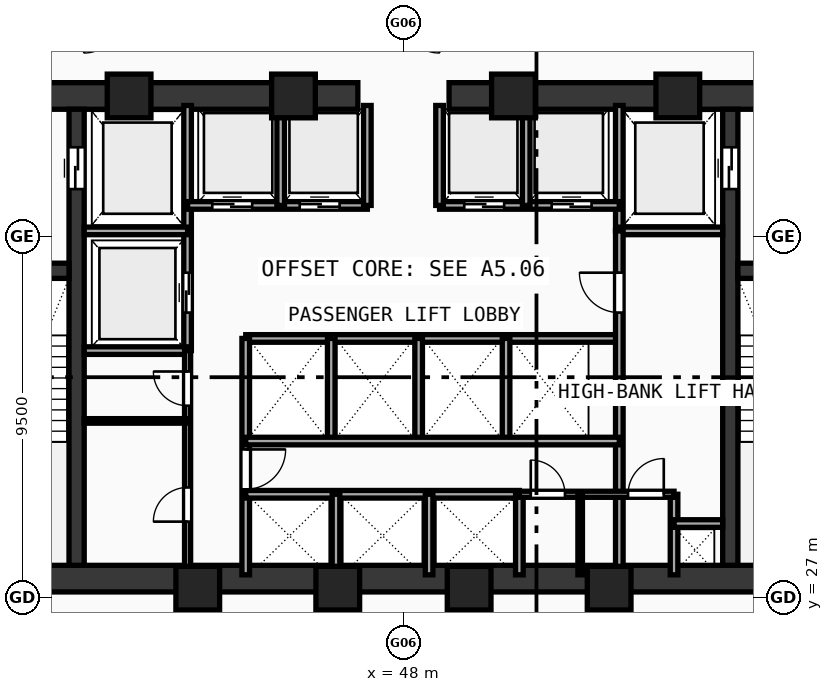
"""IFC4 building model, lengths in metres.
Left out: names, types, materials, properties, quantities, classifications, styles, units other than length and angle.
Written with IfcOpenShell. Run it as: python <this file> out.ifc"""

import sys

from ifc_helpers import new_model, si_unit, direction, frame, frame_2d, origin, origin_with_axes, origin_2d, place, context, subcontext, project, spatial, rectangle, hollow_rectangle, extrude, source, transform, mapped, element, fill, save


model = new_model("IFC4")
c1 = context("Model", 3, precision=1e-05, world=origin(), true_north=direction((0.0, 1.0)))
c2 = subcontext(c1, "Body", "Model", "MODEL_VIEW")
j1 = project(units=[si_unit("LENGTHUNIT", "METRE"), si_unit("PLANEANGLEUNIT", "RADIAN")], contexts=[c1])
p1 = place(None, origin())
s1 = spatial("IfcSite", under=j1, at=p1, CompositionType="ELEMENT")
p2 = place(p1, origin())
s2 = spatial("IfcBuilding", under=s1, at=p2, CompositionType="ELEMENT")
p3 = place(p2, frame((0.0, 0.0, 63.07)))
s3 = spatial("IfcBuildingStorey", under=s2, at=p3, CompositionType="ELEMENT", Elevation=63.07)
p4 = place(p3, frame((35.45, 27.5, 0.0), z_axis=(0.0, 0.0, 1.0), x_axis=(1.0, 0.0, 0.0)))
e1 = element("IfcWall", 1, at=p4, inside=s3, PredefinedType="SHEAR", context=c2, shape_type="SweptSolid", body=[
    extrude(rectangle(XDim=25.1, YDim=0.7, at=frame_2d((12.55, 0.0))), origin(), (0.0, 0.0, 1.0), 3.37),
])
p5 = place(p3, frame((35.45, 40.2, 0.0), z_axis=(0.0, 0.0, 1.0), x_axis=(1.0, 0.0, 0.0)))
e2 = element("IfcWall", 2, at=p5, inside=s3, PredefinedType="SHEAR", context=c2, shape_type="SweptSolid", body=[
    extrude(rectangle(XDim=11.35, YDim=0.7, at=frame_2d((5.675, 0.0))), origin(), (0.0, 0.0, 1.0), 3.37),
])
p6 = place(p5, frame((1.7, 0.0, 0.0)))
e3 = element("IfcOpeningElement", 3, at=p6, cuts=e2, PredefinedType="OPENING", context=c2, shape_type="SweptSolid", body=[
    extrude(rectangle(XDim=1.05, YDim=2.1, at=frame_2d((0.525, 1.05))), frame((0.0, 0.36, 0.0), z_axis=(0.0, -1.0, 0.0), x_axis=(1.0, 0.0, 0.0)), (0.0, 0.0, 1.0), 0.72),
])
p7 = place(p3, frame((49.2, 40.2, 0.0), z_axis=(0.0, 0.0, 1.0), x_axis=(1.0, 0.0, 0.0)))
e4 = element("IfcWall", 4, at=p7, inside=s3, PredefinedType="SHEAR", context=c2, shape_type="SweptSolid", body=[
    extrude(rectangle(XDim=11.35, YDim=0.7, at=frame_2d((5.675, 0.0))), origin(), (0.0, 0.0, 1.0), 3.37),
])
p8 = place(p7, frame((8.6, 0.0, 0.0)))
e5 = element("IfcOpeningElement", 5, at=p8, cuts=e4, PredefinedType="OPENING", context=c2, shape_type="SweptSolid", body=[
    extrude(rectangle(XDim=1.05, YDim=2.1, at=frame_2d((0.525, 1.05))), frame((0.0, 0.36, 0.0), z_axis=(0.0, -1.0, 0.0), x_axis=(1.0, 0.0, 0.0)), (0.0, 0.0, 1.0), 0.72),
])
p9 = place(p3, frame((39.4, 27.85, 0.0), z_axis=(0.0, 0.0, 1.0), x_axis=(0.0, 1.0, 0.0)))
e6 = element("IfcWall", 6, at=p9, inside=s3, PredefinedType="SHEAR", context=c2, shape_type="SweptSolid", body=[
    extrude(rectangle(XDim=12.0, YDim=0.4, at=frame_2d((6.0, 0.0))), origin(), (0.0, 0.0, 1.0), 3.37),
])
p10 = place(p9, frame((9.9, 0.0, 0.0)))
e7 = element("IfcOpeningElement", 7, at=p10, cuts=e6, PredefinedType="OPENING", context=c2, shape_type="SweptSolid", body=[
    extrude(rectangle(XDim=1.1, YDim=2.1, at=frame_2d((0.55, 1.05))), frame((0.0, 0.21, 0.0), z_axis=(0.0, -1.0, 0.0), x_axis=(1.0, 0.0, 0.0)), (0.0, 0.0, 1.0), 0.42),
])
p11 = place(p3, frame((56.6, 27.85, 0.0), z_axis=(0.0, 0.0, 1.0), x_axis=(0.0, 1.0, 0.0)))
e8 = element("IfcWall", 8, at=p11, inside=s3, PredefinedType="SHEAR", context=c2, shape_type="SweptSolid", body=[
    extrude(rectangle(XDim=12.0, YDim=0.4, at=frame_2d((6.0, 0.0))), origin(), (0.0, 0.0, 1.0), 3.37),
])
p12 = place(p11, frame((9.9, 0.0, 0.0)))
e9 = element("IfcOpeningElement", 9, at=p12, cuts=e8, PredefinedType="OPENING", context=c2, shape_type="SweptSolid", body=[
    extrude(rectangle(XDim=1.1, YDim=2.1, at=frame_2d((0.55, 1.05))), frame((0.0, 0.21, 0.0), z_axis=(0.0, -1.0, 0.0), x_axis=(1.0, 0.0, 0.0)), (0.0, 0.0, 1.0), 0.42),
])
p13 = place(p3, frame((36.15, 35.6, 0.0), z_axis=(0.0, 0.0, 1.0), x_axis=(1.0, 0.0, 0.0)))
e10 = element("IfcWall", 10, at=p13, inside=s3, PredefinedType="SHEAR", context=c2, shape_type="SweptSolid", body=[
    extrude(rectangle(XDim=3.05, YDim=0.4, at=frame_2d((1.525, 0.0))), origin(), (0.0, 0.0, 1.0), 3.37),
])
p14 = place(p13, frame((0.97, 0.0, 0.0)))
e11 = element("IfcOpeningElement", 11, at=p14, cuts=e10, PredefinedType="OPENING", context=c2, shape_type="SweptSolid", body=[
    extrude(rectangle(XDim=1.05, YDim=2.1, at=frame_2d((0.525, 1.05))), frame((0.0, 0.21, 0.0), z_axis=(0.0, -1.0, 0.0), x_axis=(1.0, 0.0, 0.0)), (0.0, 0.0, 1.0), 0.42),
])
p15 = place(p3, frame((56.8, 35.6, 0.0), z_axis=(0.0, 0.0, 1.0), x_axis=(1.0, 0.0, 0.0)))
e12 = element("IfcWall", 12, at=p15, inside=s3, PredefinedType="SHEAR", context=c2, shape_type="SweptSolid", body=[
    extrude(rectangle(XDim=3.05, YDim=0.4, at=frame_2d((1.525, 0.0))), origin(), (0.0, 0.0, 1.0), 3.37),
])
p16 = place(p15, frame((1.02, 0.0, 0.0)))
e13 = element("IfcOpeningElement", 13, at=p16, cuts=e12, PredefinedType="OPENING", context=c2, shape_type="SweptSolid", body=[
    extrude(rectangle(XDim=1.05, YDim=2.1, at=frame_2d((0.525, 1.05))), frame((0.0, 0.21, 0.0), z_axis=(0.0, -1.0, 0.0), x_axis=(1.0, 0.0, 0.0)), (0.0, 0.0, 1.0), 0.42),
])
m1 = source(origin(), c2, "Body", "SweptSolid", [
    extrude(hollow_rectangle(XDim=1.15, YDim=1.15, WallThickness=0.048, at=origin_2d()), origin(), (0.0, 0.0, 1.0), 3.63),
])
for number, where, z_axis, x_axis in (
    (14, (42.588, 27.25, -0.26), (0.0, 0.0, 1.0), (1.0, 0.0, 0.0)),
    (15, (46.272, 27.25, -0.26), (0.0, 0.0, 1.0), (1.0, 0.0, 0.0)),
    (16, (49.729, 27.25, -0.26), (0.0, 0.0, 1.0), (1.0, 0.0, 0.0)),
    (17, (53.412, 27.25, -0.26), (0.0, 0.0, 1.0), (1.0, 0.0, 0.0)),
    (18, (55.219, 40.2, -0.26), (0.0, 0.0, 1.0), (1.0, 0.0, 0.0)),
    (19, (50.894, 40.2, -0.26), (0.0, 0.0, 1.0), (1.0, 0.0, 0.0)),
    (20, (45.106, 40.2, -0.26), (0.0, 0.0, 1.0), (1.0, 0.0, 0.0)),
    (21, (40.781, 40.2, -0.26), (0.0, 0.0, 1.0), (1.0, 0.0, 0.0)),
):
    element("IfcColumn", number, at=place(p3, frame(where, z_axis=z_axis, x_axis=x_axis)), inside=s3, PredefinedType="COLUMN", context=c2, shape_type="MappedRepresentation", body=[
        mapped(m1, transform((0.0, 0.0, 0.0), scale=1.0)),
    ])
p17 = place(p3, frame((42.32, 33.5, 0.0), z_axis=(0.0, 0.0, 1.0), x_axis=(0.0, 1.0, 0.0)))
e22 = element("IfcWall", 22, at=p17, inside=s3, PredefinedType="SOLIDWALL", context=c2, shape_type="SweptSolid", body=[
    extrude(rectangle(XDim=6.45, YDim=0.2, at=frame_2d((3.225, 0.0))), origin(), (0.0, 0.0, 1.0), 3.37),
])
p18 = place(p17, frame((1.0, 0.0, 0.0)))
e23 = element("IfcOpeningElement", 23, at=p18, cuts=e22, PredefinedType="OPENING", context=c2, shape_type="SweptSolid", body=[
    extrude(rectangle(XDim=1.05, YDim=2.1, at=frame_2d((0.525, 1.05))), frame((0.0, 0.11, 0.0), z_axis=(0.0, -1.0, 0.0), x_axis=(1.0, 0.0, 0.0)), (0.0, 0.0, 1.0), 0.22),
])
for number, where, z_axis, x_axis in (
    (24, (39.6, 36.65, 0.0), (0.0, 0.0, 1.0), (1.0, 0.0, 0.0)),
    (25, (39.6, 33.5, 0.0), (0.0, 0.0, 1.0), (1.0, 0.0, 0.0)),
):
    element("IfcWall", number, at=place(p3, frame(where, z_axis=z_axis, x_axis=x_axis)), inside=s3, PredefinedType="SOLIDWALL", context=c2, shape_type="SweptSolid", body=[
        extrude(rectangle(XDim=2.72, YDim=0.2, at=frame_2d((1.36, 0.0))), origin(), (0.0, 0.0, 1.0), 3.37),
    ])
p19 = place(p3, frame((53.68, 36.65, 0.0), z_axis=(0.0, 0.0, 1.0), x_axis=(0.0, 1.0, 0.0)))
e26 = element("IfcWall", 26, at=p19, inside=s3, PredefinedType="SOLIDWALL", context=c2, shape_type="SweptSolid", body=[
    extrude(rectangle(XDim=3.3, YDim=0.2, at=frame_2d((1.65, 0.0))), origin(), (0.0, 0.0, 1.0), 3.37),
])
p20 = place(p3, frame((53.68, 36.65, 0.0), z_axis=(0.0, 0.0, 1.0), x_axis=(1.0, 0.0, 0.0)))
e27 = element("IfcWall", 27, at=p20, inside=s3, PredefinedType="SOLIDWALL", context=c2, shape_type="SweptSolid", body=[
    extrude(rectangle(XDim=2.72, YDim=0.2, at=frame_2d((1.36, 0.0))), origin(), (0.0, 0.0, 1.0), 3.37),
])
p21 = place(p3, frame((42.32, 37.32, 0.0), z_axis=(0.0, 0.0, 1.0), x_axis=(1.0, 0.0, 0.0)))
e28 = element("IfcWall", 28, at=p21, inside=s3, PredefinedType="SOLIDWALL", context=c2, shape_type="SweptSolid", body=[
    extrude(rectangle(XDim=4.73, YDim=0.2, at=frame_2d((2.365, 0.0))), origin(), (0.0, 0.0, 1.0), 3.37),
])
p22 = place(p21, frame((0.65, 0.0, 0.0)))
e29 = element("IfcOpeningElement", 29, at=p22, cuts=e28, PredefinedType="OPENING", context=c2, shape_type="SweptSolid", body=[
    extrude(rectangle(XDim=1.05, YDim=2.1, at=frame_2d((0.525, 1.05))), frame((0.0, 0.11, 0.0), z_axis=(0.0, -1.0, 0.0), x_axis=(1.0, 0.0, 0.0)), (0.0, 0.0, 1.0), 0.22),
])
p23 = place(p21, frame((2.95, 0.0, 0.0)))
e30 = element("IfcOpeningElement", 30, at=p23, cuts=e28, PredefinedType="OPENING", context=c2, shape_type="SweptSolid", body=[
    extrude(rectangle(XDim=1.05, YDim=2.1, at=frame_2d((0.525, 1.05))), frame((0.0, 0.11, 0.0), z_axis=(0.0, -1.0, 0.0), x_axis=(1.0, 0.0, 0.0)), (0.0, 0.0, 1.0), 0.22),
])
p24 = place(p3, frame((48.95, 37.32, 0.0), z_axis=(0.0, 0.0, 1.0), x_axis=(1.0, 0.0, 0.0)))
e31 = element("IfcWall", 31, at=p24, inside=s3, PredefinedType="SOLIDWALL", context=c2, shape_type="SweptSolid", body=[
    extrude(rectangle(XDim=4.73, YDim=0.2, at=frame_2d((2.365, 0.0))), origin(), (0.0, 0.0, 1.0), 3.37),
])
p25 = place(p24, frame((0.65, 0.0, 0.0)))
e32 = element("IfcOpeningElement", 32, at=p25, cuts=e31, PredefinedType="OPENING", context=c2, shape_type="SweptSolid", body=[
    extrude(rectangle(XDim=1.05, YDim=2.1, at=frame_2d((0.525, 1.05))), frame((0.0, 0.11, 0.0), z_axis=(0.0, -1.0, 0.0), x_axis=(1.0, 0.0, 0.0)), (0.0, 0.0, 1.0), 0.22),
])
p26 = place(p24, frame((2.95, 0.0, 0.0)))
e33 = element("IfcOpeningElement", 33, at=p26, cuts=e31, PredefinedType="OPENING", context=c2, shape_type="SweptSolid", body=[
    extrude(rectangle(XDim=1.05, YDim=2.1, at=frame_2d((0.525, 1.05))), frame((0.0, 0.11, 0.0), z_axis=(0.0, -1.0, 0.0), x_axis=(1.0, 0.0, 0.0)), (0.0, 0.0, 1.0), 0.22),
])
for number, where, z_axis, x_axis in (
    (34, (47.05, 37.32, 0.0), (0.0, 0.0, 1.0), (0.0, 1.0, 0.0)),
    (35, (48.95, 37.32, 0.0), (0.0, 0.0, 1.0), (0.0, 1.0, 0.0)),
    (36, (44.77, 37.32, 0.0), (0.0, 0.0, 1.0), (0.0, 1.0, 0.0)),
    (37, (51.23, 37.32, 0.0), (0.0, 0.0, 1.0), (0.0, 1.0, 0.0)),
):
    element("IfcWall", number, at=place(p3, frame(where, z_axis=z_axis, x_axis=x_axis)), inside=s3, PredefinedType="SOLIDWALL", context=c2, shape_type="SweptSolid", body=[
        extrude(rectangle(XDim=2.63, YDim=0.2, at=frame_2d((1.315, 0.0))), origin(), (0.0, 0.0, 1.0), 3.37),
    ])
p27 = place(p3, frame((43.85, 33.82, 0.0), z_axis=(0.0, 0.0, 1.0), x_axis=(1.0, 0.0, 0.0)))
e38 = element("IfcWall", 38, at=p27, inside=s3, PredefinedType="SOLIDWALL", context=c2, shape_type="SweptSolid", body=[
    extrude(rectangle(XDim=9.83, YDim=0.2, at=frame_2d((4.915, 0.0))), origin(), (0.0, 0.0, 1.0), 3.37),
])
p28 = place(p3, frame((43.85, 27.6, 0.0), z_axis=(0.0, 0.0, 1.0), x_axis=(0.0, 1.0, 0.0)))
e39 = element("IfcWall", 39, at=p28, inside=s3, PredefinedType="SOLIDWALL", context=c2, shape_type="SweptSolid", body=[
    extrude(rectangle(XDim=6.22, YDim=0.2, at=frame_2d((3.11, 0.0))), origin(), (0.0, 0.0, 1.0), 3.37),
])
p29 = place(p28, frame((2.25, 0.0, 0.0)))
e40 = element("IfcOpeningElement", 40, at=p29, cuts=e39, PredefinedType="OPENING", context=c2, shape_type="SweptSolid", body=[
    extrude(rectangle(XDim=1.05, YDim=2.1, at=frame_2d((0.525, 1.05))), frame((0.0, 0.11, 0.0), z_axis=(0.0, -1.0, 0.0), x_axis=(1.0, 0.0, 0.0)), (0.0, 0.0, 1.0), 0.22),
])
p30 = place(p3, frame((53.68, 27.6, 0.0), z_axis=(0.0, 0.0, 1.0), x_axis=(0.0, 1.0, 0.0)))
e41 = element("IfcWall", 41, at=p30, inside=s3, PredefinedType="SOLIDWALL", context=c2, shape_type="SweptSolid", body=[
    extrude(rectangle(XDim=9.05, YDim=0.2, at=frame_2d((4.525, 0.0))), origin(), (0.0, 0.0, 1.0), 3.37),
])
p31 = place(p30, frame((6.9, 0.0, 0.0)))
e42 = element("IfcOpeningElement", 42, at=p31, cuts=e41, PredefinedType="OPENING", context=c2, shape_type="SweptSolid", body=[
    extrude(rectangle(XDim=1.05, YDim=2.1, at=frame_2d((0.525, 1.05))), frame((0.0, 0.11, 0.0), z_axis=(0.0, -1.0, 0.0), x_axis=(1.0, 0.0, 0.0)), (0.0, 0.0, 1.0), 0.22),
])
for number, where, z_axis, x_axis in (
    (43, (46.1, 31.12, 0.0), (0.0, 0.0, 1.0), (0.0, 1.0, 0.0)),
    (44, (48.4, 31.12, 0.0), (0.0, 0.0, 1.0), (0.0, 1.0, 0.0)),
    (45, (50.7, 31.12, 0.0), (0.0, 0.0, 1.0), (0.0, 1.0, 0.0)),
):
    element("IfcWall", number, at=place(p3, frame(where, z_axis=z_axis, x_axis=x_axis)), inside=s3, PredefinedType="SOLIDWALL", context=c2, shape_type="SweptSolid", body=[
        extrude(rectangle(XDim=2.7, YDim=0.2, at=frame_2d((1.35, 0.0))), origin(), (0.0, 0.0, 1.0), 3.37),
    ])
p32 = place(p3, frame((43.85, 29.72, 0.0), z_axis=(0.0, 0.0, 1.0), x_axis=(1.0, 0.0, 0.0)))
e46 = element("IfcWall", 46, at=p32, inside=s3, PredefinedType="SOLIDWALL", context=c2, shape_type="SweptSolid", body=[
    extrude(rectangle(XDim=7.2, YDim=0.2, at=frame_2d((3.6, 0.0))), origin(), (0.0, 0.0, 1.0), 3.37),
])
p33 = place(p3, frame((51.05, 27.6, 0.0), z_axis=(0.0, 0.0, 1.0), x_axis=(0.0, 1.0, 0.0)))
e47 = element("IfcWall", 47, at=p33, inside=s3, PredefinedType="SOLIDWALL", context=c2, shape_type="SweptSolid", body=[
    extrude(rectangle(XDim=2.12, YDim=0.2, at=frame_2d((1.06, 0.0))), origin(), (0.0, 0.0, 1.0), 3.37),
])
p34 = place(p3, frame((43.85, 31.12, 0.0), z_axis=(0.0, 0.0, 1.0), x_axis=(1.0, 0.0, 0.0)))
e48 = element("IfcWall", 48, at=p34, inside=s3, PredefinedType="SOLIDWALL", context=c2, shape_type="SweptSolid", body=[
    extrude(rectangle(XDim=9.83, YDim=0.2, at=frame_2d((4.915, 0.0))), origin(), (0.0, 0.0, 1.0), 3.37),
])
for number, where, z_axis, x_axis in (
    (49, (46.225, 27.6, 0.0), (0.0, 0.0, 1.0), (0.0, 1.0, 0.0)),
    (50, (48.675, 27.6, 0.0), (0.0, 0.0, 1.0), (0.0, 1.0, 0.0)),
    (51, (55.12, 27.6, 0.0), (0.0, 0.0, 1.0), (0.0, 1.0, 0.0)),
):
    element("IfcWall", number, at=place(p3, frame(where, z_axis=z_axis, x_axis=x_axis)), inside=s3, PredefinedType="SOLIDWALL", context=c2, shape_type="SweptSolid", body=[
        extrude(rectangle(XDim=2.12, YDim=0.2, at=frame_2d((1.06, 0.0))), origin(), (0.0, 0.0, 1.0), 3.37),
    ])
p35 = place(p3, frame((55.12, 28.95, 0.0), z_axis=(0.0, 0.0, 1.0), x_axis=(1.0, 0.0, 0.0)))
e52 = element("IfcWall", 52, at=p35, inside=s3, PredefinedType="SOLIDWALL", context=c2, shape_type="SweptSolid", body=[
    extrude(rectangle(XDim=1.28, YDim=0.2, at=frame_2d((0.64, 0.0))), origin(), (0.0, 0.0, 1.0), 3.37),
])
p36 = place(p3, frame((42.32, 27.6, 0.0), z_axis=(0.0, 0.0, 1.0), x_axis=(0.0, 1.0, 0.0)))
e53 = element("IfcWall", 53, at=p36, inside=s3, PredefinedType="PARTITIONING", context=c2, shape_type="SweptSolid", body=[
    extrude(rectangle(XDim=5.9, YDim=0.16, at=frame_2d((2.95, 0.0))), origin(), (0.0, 0.0, 1.0), 3.37),
])
p37 = place(p36, frame((1.4, 0.0, 0.0)))
e54 = element("IfcOpeningElement", 54, at=p37, cuts=e53, PredefinedType="OPENING", context=c2, shape_type="SweptSolid", body=[
    extrude(rectangle(XDim=0.9, YDim=2.1, at=frame_2d((0.45, 1.05))), frame((0.0, 0.09, 0.0), z_axis=(0.0, -1.0, 0.0), x_axis=(1.0, 0.0, 0.0)), (0.0, 0.0, 1.0), 0.18),
])
p38 = place(p36, frame((4.45, 0.0, 0.0)))
e55 = element("IfcOpeningElement", 55, at=p38, cuts=e53, PredefinedType="OPENING", context=c2, shape_type="SweptSolid", body=[
    extrude(rectangle(XDim=0.9, YDim=2.1, at=frame_2d((0.45, 1.05))), frame((0.0, 0.09, 0.0), z_axis=(0.0, -1.0, 0.0), x_axis=(1.0, 0.0, 0.0)), (0.0, 0.0, 1.0), 0.18),
])
p39 = place(p3, frame((51.05, 29.72, 0.0), z_axis=(0.0, 0.0, 1.0), x_axis=(1.0, 0.0, 0.0)))
e56 = element("IfcWall", 56, at=p39, inside=s3, PredefinedType="PARTITIONING", context=c2, shape_type="SweptSolid", body=[
    extrude(rectangle(XDim=4.07, YDim=0.16, at=frame_2d((2.035, 0.0))), origin(), (0.0, 0.0, 1.0), 3.37),
])
p40 = place(p39, frame((0.3, 0.0, 0.0)))
e57 = element("IfcOpeningElement", 57, at=p40, cuts=e56, PredefinedType="OPENING", context=c2, shape_type="SweptSolid", body=[
    extrude(rectangle(XDim=0.9, YDim=2.1, at=frame_2d((0.45, 1.05))), frame((0.0, 0.09, 0.0), z_axis=(0.0, -1.0, 0.0), x_axis=(1.0, 0.0, 0.0)), (0.0, 0.0, 1.0), 0.18),
])
p41 = place(p39, frame((2.86, 0.0, 0.0)))
e58 = element("IfcOpeningElement", 58, at=p41, cuts=e56, PredefinedType="OPENING", context=c2, shape_type="SweptSolid", body=[
    extrude(rectangle(XDim=0.94, YDim=2.1, at=frame_2d((0.47, 1.05))), frame((0.0, 0.09, 0.0), z_axis=(0.0, -1.0, 0.0), x_axis=(1.0, 0.0, 0.0)), (0.0, 0.0, 1.0), 0.18),
])
p42 = place(p3, frame((39.6, 31.65, 0.0), z_axis=(0.0, 0.0, 1.0), x_axis=(1.0, 0.0, 0.0)))
e59 = element("IfcWall", 59, at=p42, inside=s3, PredefinedType="PARTITIONING", context=c2, shape_type="SweptSolid", body=[
    extrude(rectangle(XDim=2.72, YDim=0.12, at=frame_2d((1.36, 0.0))), origin(), (0.0, 0.0, 1.0), 3.37),
])
p43 = place(p3, frame((52.65, 27.6, 0.0), z_axis=(0.0, 0.0, 1.0), x_axis=(0.0, 1.0, 0.0)))
e60 = element("IfcWall", 60, at=p43, inside=s3, PredefinedType="PARTITIONING", context=c2, shape_type="SweptSolid", body=[
    extrude(rectangle(XDim=2.12, YDim=0.12, at=frame_2d((1.06, 0.0))), origin(), (0.0, 0.0, 1.0), 3.37),
])
m2 = source(origin(), c2, "Body", "SweptSolid", [
    extrude(rectangle(XDim=1.1, YDim=2.1, at=frame_2d((0.55, 1.05))), frame((0.0, 0.025, 0.0), z_axis=(0.0, -1.0, 0.0), x_axis=(1.0, 0.0, 0.0)), (0.0, 0.0, 1.0), 0.05),
])
p44 = place(p10, frame((1.1, 0.0, 0.0), z_axis=(0.0, 0.0, 1.0), x_axis=(-1.0, 0.0, 0.0)))
e61 = element("IfcDoor", 61, at=p44, inside=s3, OperationType="DOUBLE_DOOR_SLIDING", PredefinedType="DOOR", context=c2, shape_type="MappedRepresentation", body=[
    mapped(m2, transform((0.0, 0.0, 0.0), scale=1.0)),
])
fill(e7, e61)
p45 = place(p12, origin_with_axes())
e62 = element("IfcDoor", 62, at=p45, inside=s3, OperationType="DOUBLE_DOOR_SLIDING", PredefinedType="DOOR", context=c2, shape_type="MappedRepresentation", body=[
    mapped(m2, transform((0.0, 0.0, 0.0), scale=1.0)),
])
fill(e9, e62)
m3 = source(origin(), c2, "Body", "SweptSolid", [
    extrude(rectangle(XDim=1.05, YDim=2.1, at=frame_2d((0.525, 1.05))), frame((0.0, 0.025, 0.0), z_axis=(0.0, -1.0, 0.0), x_axis=(1.0, 0.0, 0.0)), (0.0, 0.0, 1.0), 0.05),
])
p46 = place(p18, origin_with_axes())
e63 = element("IfcDoor", 63, at=p46, inside=s3, OperationType="DOUBLE_DOOR_SLIDING", PredefinedType="DOOR", context=c2, shape_type="MappedRepresentation", body=[
    mapped(m3, transform((0.0, 0.0, 0.0), scale=1.0)),
])
fill(e23, e63)
p47 = place(p22, frame((1.05, 0.0, 0.0), z_axis=(0.0, 0.0, 1.0), x_axis=(-1.0, 0.0, 0.0)))
e64 = element("IfcDoor", 64, at=p47, inside=s3, OperationType="DOUBLE_DOOR_SLIDING", PredefinedType="DOOR", context=c2, shape_type="MappedRepresentation", body=[
    mapped(m3, transform((0.0, 0.0, 0.0), scale=1.0)),
])
fill(e29, e64)
p48 = place(p23, frame((1.05, 0.0, 0.0), z_axis=(0.0, 0.0, 1.0), x_axis=(-1.0, 0.0, 0.0)))
e65 = element("IfcDoor", 65, at=p48, inside=s3, OperationType="DOUBLE_DOOR_SLIDING", PredefinedType="DOOR", context=c2, shape_type="MappedRepresentation", body=[
    mapped(m3, transform((0.0, 0.0, 0.0), scale=1.0)),
])
fill(e30, e65)
p49 = place(p25, frame((1.05, 0.0, 0.0), z_axis=(0.0, 0.0, 1.0), x_axis=(-1.0, 0.0, 0.0)))
e66 = element("IfcDoor", 66, at=p49, inside=s3, OperationType="DOUBLE_DOOR_SLIDING", PredefinedType="DOOR", context=c2, shape_type="MappedRepresentation", body=[
    mapped(m3, transform((0.0, 0.0, 0.0), scale=1.0)),
])
fill(e32, e66)
p50 = place(p26, frame((1.05, 0.0, 0.0), z_axis=(0.0, 0.0, 1.0), x_axis=(-1.0, 0.0, 0.0)))
e67 = element("IfcDoor", 67, at=p50, inside=s3, OperationType="DOUBLE_DOOR_SLIDING", PredefinedType="DOOR", context=c2, shape_type="MappedRepresentation", body=[
    mapped(m3, transform((0.0, 0.0, 0.0), scale=1.0)),
])
fill(e33, e67)
p51 = place(p29, frame((1.05, 0.0, 0.0), z_axis=(0.0, 0.0, 1.0), x_axis=(-1.0, 0.0, 0.0)))
e68 = element("IfcDoor", 68, at=p51, inside=s3, OperationType="SINGLE_SWING_LEFT", PredefinedType="DOOR", context=c2, shape_type="MappedRepresentation", body=[
    mapped(m3, transform((0.0, 0.0, 0.0), scale=1.0)),
])
fill(e40, e68)
p52 = place(p31, origin_with_axes())
e69 = element("IfcDoor", 69, at=p52, inside=s3, OperationType="SINGLE_SWING_RIGHT", PredefinedType="DOOR", context=c2, shape_type="MappedRepresentation", body=[
    mapped(m3, transform((0.0, 0.0, 0.0), scale=1.0)),
])
fill(e42, e69)
m4 = source(origin(), c2, "Body", "SweptSolid", [
    extrude(rectangle(XDim=0.9, YDim=2.1, at=frame_2d((0.45, 1.05))), frame((0.0, 0.025, 0.0), z_axis=(0.0, -1.0, 0.0), x_axis=(1.0, 0.0, 0.0)), (0.0, 0.0, 1.0), 0.05),
])
p53 = place(p37, origin_with_axes())
e70 = element("IfcDoor", 70, at=p53, inside=s3, OperationType="SINGLE_SWING_LEFT", PredefinedType="DOOR", context=c2, shape_type="MappedRepresentation", body=[
    mapped(m4, transform((0.0, 0.0, 0.0), scale=1.0)),
])
fill(e54, e70)
p54 = place(p38, origin_with_axes())
e71 = element("IfcDoor", 71, at=p54, inside=s3, OperationType="SINGLE_SWING_RIGHT", PredefinedType="DOOR", context=c2, shape_type="MappedRepresentation", body=[
    mapped(m4, transform((0.0, 0.0, 0.0), scale=1.0)),
])
fill(e55, e71)
p55 = place(p40, origin_with_axes())
e72 = element("IfcDoor", 72, at=p55, inside=s3, OperationType="SINGLE_SWING_LEFT", PredefinedType="DOOR", context=c2, shape_type="MappedRepresentation", body=[
    mapped(m4, transform((0.0, 0.0, 0.0), scale=1.0)),
])
fill(e57, e72)
m5 = source(origin(), c2, "Body", "SweptSolid", [
    extrude(rectangle(XDim=0.94, YDim=2.1, at=frame_2d((0.47, 1.05))), frame((0.0, 0.025, 0.0), z_axis=(0.0, -1.0, 0.0), x_axis=(1.0, 0.0, 0.0)), (0.0, 0.0, 1.0), 0.05),
])
p56 = place(p41, origin_with_axes())
e73 = element("IfcDoor", 73, at=p56, inside=s3, OperationType="SINGLE_SWING_RIGHT", PredefinedType="DOOR", context=c2, shape_type="MappedRepresentation", body=[
    mapped(m5, transform((0.0, 0.0, 0.0), scale=1.0)),
])
fill(e58, e73)
save(model, sys.argv[1])
